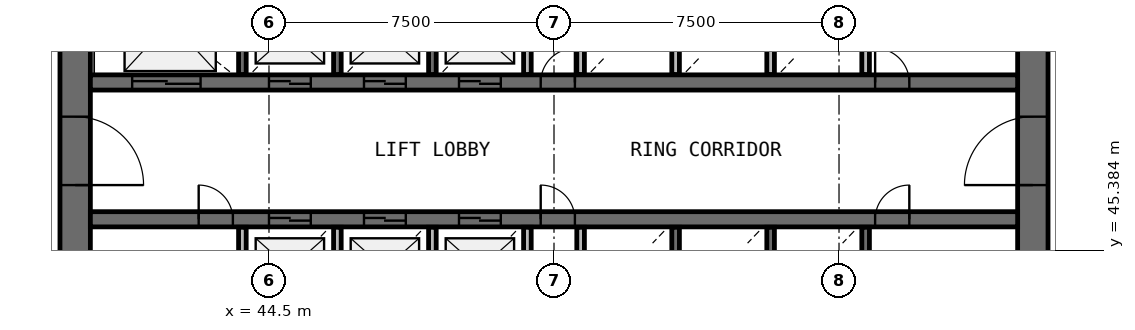
"""IFC4 building model, lengths in metres.
Left out: names, types, materials, properties, quantities, classifications, styles, units other than length and angle.
Written with IfcOpenShell. Run it as: python <this file> out.ifc"""

import sys

from ifc_helpers import new_model, si_unit, direction, frame, frame_2d, origin, place, context, subcontext, project, spatial, rectangle, extrude, source, transform, mapped, element, fill, save


model = new_model("IFC4")
c1 = context("Model", 3, precision=1e-05, world=origin(), true_north=direction((0.0, 1.0)))
c2 = subcontext(c1, "Body", "Model", "MODEL_VIEW")
j1 = project(units=[si_unit("LENGTHUNIT", "METRE"), si_unit("PLANEANGLEUNIT", "RADIAN")], contexts=[c1])
p1 = place(None, origin())
s1 = spatial("IfcSite", under=j1, at=p1, CompositionType="ELEMENT")
p2 = place(p1, origin())
s2 = spatial("IfcBuilding", under=s1, at=p2, CompositionType="ELEMENT")
p3 = place(p2, frame((0.0, 0.0, 120.8)))
s3 = spatial("IfcBuildingStorey", under=s2, at=p3, CompositionType="ELEMENT", Elevation=120.8)
p4 = place(p3, frame((64.6, 38.0, 0.0), z_axis=(0.0, 0.0, 1.0), x_axis=(0.0, 1.0, 0.0)))
e1 = element("IfcWall", 1, at=p4, inside=s3, PredefinedType="SHEAR", context=c2, shape_type="SweptSolid", body=[
    extrude(rectangle(XDim=20.0, YDim=0.8, at=frame_2d((10.0, 0.0))), origin(), (0.0, 0.0, 1.0), 4.1),
])
p5 = place(p4, frame((9.1, 0.0, 0.0)))
e2 = element("IfcOpeningElement", 2, at=p5, cuts=e1, PredefinedType="OPENING", context=c2, shape_type="SweptSolid", body=[
    extrude(rectangle(XDim=1.8, YDim=2.1, at=frame_2d((0.9, 1.05))), frame((0.0, 0.41, 0.0), z_axis=(0.0, -1.0, 0.0), x_axis=(1.0, 0.0, 0.0)), (0.0, 0.0, 1.0), 0.82),
])
p6 = place(p3, frame((39.4, 58.0, 0.0), z_axis=(0.0, 0.0, 1.0), x_axis=(0.0, -1.0, 0.0)))
e3 = element("IfcWall", 3, at=p6, inside=s3, PredefinedType="SHEAR", context=c2, shape_type="SweptSolid", body=[
    extrude(rectangle(XDim=20.0, YDim=0.8, at=frame_2d((10.0, 0.0))), origin(), (0.0, 0.0, 1.0), 4.1),
])
p7 = place(p6, frame((9.1, 0.0, 0.0)))
e4 = element("IfcOpeningElement", 4, at=p7, cuts=e3, PredefinedType="OPENING", context=c2, shape_type="SweptSolid", body=[
    extrude(rectangle(XDim=1.8, YDim=2.1, at=frame_2d((0.9, 1.05))), frame((0.0, 0.41, 0.0), z_axis=(0.0, -1.0, 0.0), x_axis=(1.0, 0.0, 0.0)), (0.0, 0.0, 1.0), 0.82),
])
p8 = place(p3, frame((39.8, 49.8, 0.0), z_axis=(0.0, 0.0, 1.0), x_axis=(1.0, 0.0, 0.0)))
e5 = element("IfcWall", 5, at=p8, inside=s3, PredefinedType="SHEAR", context=c2, shape_type="SweptSolid", body=[
    extrude(rectangle(XDim=24.4, YDim=0.4, at=frame_2d((12.2, 0.0))), origin(), (0.0, 0.0, 1.0), 4.1),
])
p9 = place(p8, frame((4.7, 0.0, 0.0)))
e6 = element("IfcOpeningElement", 6, at=p9, cuts=e5, PredefinedType="OPENING", context=c2, shape_type="SweptSolid", body=[
    extrude(rectangle(XDim=1.1, YDim=2.1, at=frame_2d((0.55, 1.05))), frame((0.0, 0.21, 0.0), z_axis=(0.0, -1.0, 0.0), x_axis=(1.0, 0.0, 0.0)), (0.0, 0.0, 1.0), 0.42),
])
p10 = place(p8, frame((7.2, 0.0, 0.0)))
e7 = element("IfcOpeningElement", 7, at=p10, cuts=e5, PredefinedType="OPENING", context=c2, shape_type="SweptSolid", body=[
    extrude(rectangle(XDim=1.1, YDim=2.1, at=frame_2d((0.55, 1.05))), frame((0.0, 0.21, 0.0), z_axis=(0.0, -1.0, 0.0), x_axis=(1.0, 0.0, 0.0)), (0.0, 0.0, 1.0), 0.42),
])
p11 = place(p8, frame((9.7, 0.0, 0.0)))
e8 = element("IfcOpeningElement", 8, at=p11, cuts=e5, PredefinedType="OPENING", context=c2, shape_type="SweptSolid", body=[
    extrude(rectangle(XDim=1.1, YDim=2.1, at=frame_2d((0.55, 1.05))), frame((0.0, 0.21, 0.0), z_axis=(0.0, -1.0, 0.0), x_axis=(1.0, 0.0, 0.0)), (0.0, 0.0, 1.0), 0.42),
])
p12 = place(p8, frame((1.1, 0.0, 0.0)))
e9 = element("IfcOpeningElement", 9, at=p12, cuts=e5, PredefinedType="OPENING", context=c2, shape_type="SweptSolid", body=[
    extrude(rectangle(XDim=1.8, YDim=2.4, at=frame_2d((0.9, 1.2))), frame((0.0, 0.21, 0.0), z_axis=(0.0, -1.0, 0.0), x_axis=(1.0, 0.0, 0.0)), (0.0, 0.0, 1.0), 0.42),
])
p13 = place(p8, frame((20.65, 0.0, 0.0)))
e10 = element("IfcOpeningElement", 10, at=p13, cuts=e5, PredefinedType="OPENING", context=c2, shape_type="SweptSolid", body=[
    extrude(rectangle(XDim=0.9, YDim=2.1, at=frame_2d((0.45, 1.05))), frame((0.0, 0.21, 0.0), z_axis=(0.0, -1.0, 0.0), x_axis=(1.0, 0.0, 0.0)), (0.0, 0.0, 1.0), 0.42),
])
p14 = place(p8, frame((11.85, 0.0, 0.0)))
e11 = element("IfcOpeningElement", 11, at=p14, cuts=e5, PredefinedType="OPENING", context=c2, shape_type="SweptSolid", body=[
    extrude(rectangle(XDim=0.9, YDim=2.1, at=frame_2d((0.45, 1.05))), frame((0.0, 0.21, 0.0), z_axis=(0.0, -1.0, 0.0), x_axis=(1.0, 0.0, 0.0)), (0.0, 0.0, 1.0), 0.42),
])
p15 = place(p3, frame((39.8, 46.2, 0.0), z_axis=(0.0, 0.0, 1.0), x_axis=(1.0, 0.0, 0.0)))
e12 = element("IfcWall", 12, at=p15, inside=s3, PredefinedType="SHEAR", context=c2, shape_type="SweptSolid", body=[
    extrude(rectangle(XDim=24.4, YDim=0.4, at=frame_2d((12.2, 0.0))), origin(), (0.0, 0.0, 1.0), 4.1),
])
p16 = place(p15, frame((4.7, 0.0, 0.0)))
e13 = element("IfcOpeningElement", 13, at=p16, cuts=e12, PredefinedType="OPENING", context=c2, shape_type="SweptSolid", body=[
    extrude(rectangle(XDim=1.1, YDim=2.1, at=frame_2d((0.55, 1.05))), frame((0.0, 0.21, 0.0), z_axis=(0.0, -1.0, 0.0), x_axis=(1.0, 0.0, 0.0)), (0.0, 0.0, 1.0), 0.42),
])
p17 = place(p15, frame((7.2, 0.0, 0.0)))
e14 = element("IfcOpeningElement", 14, at=p17, cuts=e12, PredefinedType="OPENING", context=c2, shape_type="SweptSolid", body=[
    extrude(rectangle(XDim=1.1, YDim=2.1, at=frame_2d((0.55, 1.05))), frame((0.0, 0.21, 0.0), z_axis=(0.0, -1.0, 0.0), x_axis=(1.0, 0.0, 0.0)), (0.0, 0.0, 1.0), 0.42),
])
p18 = place(p15, frame((9.7, 0.0, 0.0)))
e15 = element("IfcOpeningElement", 15, at=p18, cuts=e12, PredefinedType="OPENING", context=c2, shape_type="SweptSolid", body=[
    extrude(rectangle(XDim=1.1, YDim=2.1, at=frame_2d((0.55, 1.05))), frame((0.0, 0.21, 0.0), z_axis=(0.0, -1.0, 0.0), x_axis=(1.0, 0.0, 0.0)), (0.0, 0.0, 1.0), 0.42),
])
p19 = place(p15, frame((20.65, 0.0, 0.0)))
e16 = element("IfcOpeningElement", 16, at=p19, cuts=e12, PredefinedType="OPENING", context=c2, shape_type="SweptSolid", body=[
    extrude(rectangle(XDim=0.9, YDim=2.1, at=frame_2d((0.45, 1.05))), frame((0.0, 0.21, 0.0), z_axis=(0.0, -1.0, 0.0), x_axis=(1.0, 0.0, 0.0)), (0.0, 0.0, 1.0), 0.42),
])
p20 = place(p15, frame((2.85, 0.0, 0.0)))
e17 = element("IfcOpeningElement", 17, at=p20, cuts=e12, PredefinedType="OPENING", context=c2, shape_type="SweptSolid", body=[
    extrude(rectangle(XDim=0.9, YDim=2.1, at=frame_2d((0.45, 1.05))), frame((0.0, 0.21, 0.0), z_axis=(0.0, -1.0, 0.0), x_axis=(1.0, 0.0, 0.0)), (0.0, 0.0, 1.0), 0.42),
])
p21 = place(p15, frame((11.85, 0.0, 0.0)))
e18 = element("IfcOpeningElement", 18, at=p21, cuts=e12, PredefinedType="OPENING", context=c2, shape_type="SweptSolid", body=[
    extrude(rectangle(XDim=0.9, YDim=2.1, at=frame_2d((0.45, 1.05))), frame((0.0, 0.21, 0.0), z_axis=(0.0, -1.0, 0.0), x_axis=(1.0, 0.0, 0.0)), (0.0, 0.0, 1.0), 0.42),
])
for number, where, z_axis, x_axis in (
    (19, (43.8, 45.99, 0.0), (0.0, 0.0, 1.0), (0.0, -1.0, 0.0)),
    (20, (43.8, 52.37, 0.0), (0.0, 0.0, 1.0), (0.0, -1.0, 0.0)),
):
    element("IfcWall", number, at=place(p3, frame(where, z_axis=z_axis, x_axis=x_axis)), inside=s3, PredefinedType="SOLIDWALL", context=c2, shape_type="SweptSolid", body=[
        extrude(rectangle(XDim=2.36, YDim=0.2, at=frame_2d((1.18, 0.0))), origin(), (0.0, 0.0, 1.0), 3.7),
    ])
p22 = place(p3, frame((46.3, 43.6, 0.0), z_axis=(0.0, 0.0, 1.0), x_axis=(0.0, 1.0, 0.0)))
e21 = element("IfcWall", 21, at=p22, inside=s3, PredefinedType="SOLIDWALL", context=c2, shape_type="SweptSolid", body=[
    extrude(rectangle(XDim=2.39, YDim=0.2, at=frame_2d((1.195, 0.0))), origin(), (0.0, 0.0, 1.0), 3.7),
])
for number, where, z_axis, x_axis in (
    (22, (46.3, 50.01, 0.0), (0.0, 0.0, 1.0), (0.0, 1.0, 0.0)),
    (23, (48.8, 43.63, 0.0), (0.0, 0.0, 1.0), (0.0, 1.0, 0.0)),
    (24, (48.8, 50.01, 0.0), (0.0, 0.0, 1.0), (0.0, 1.0, 0.0)),
    (25, (51.3, 43.63, 0.0), (0.0, 0.0, 1.0), (0.0, 1.0, 0.0)),
):
    element("IfcWall", number, at=place(p3, frame(where, z_axis=z_axis, x_axis=x_axis)), inside=s3, PredefinedType="SOLIDWALL", context=c2, shape_type="SweptSolid", body=[
        extrude(rectangle(XDim=2.36, YDim=0.2, at=frame_2d((1.18, 0.0))), origin(), (0.0, 0.0, 1.0), 3.7),
    ])
for number, where, z_axis, x_axis in (
    (26, (51.3, 50.01, 0.0), (0.0, 0.0, 1.0), (0.0, 1.0, 0.0)),
    (27, (52.7, 45.99, 0.0), (0.0, 0.0, 1.0), (0.0, -1.0, 0.0)),
):
    element("IfcWall", number, at=place(p3, frame(where, z_axis=z_axis, x_axis=x_axis)), inside=s3, PredefinedType="SOLIDWALL", context=c2, shape_type="SweptSolid", body=[
        extrude(rectangle(XDim=2.39, YDim=0.2, at=frame_2d((1.195, 0.0))), origin(), (0.0, 0.0, 1.0), 3.7),
    ])
for number, where, z_axis, x_axis in (
    (28, (52.7, 52.37, 0.0), (0.0, 0.0, 1.0), (0.0, -1.0, 0.0)),
    (29, (55.2, 43.63, 0.0), (0.0, 0.0, 1.0), (0.0, 1.0, 0.0)),
    (30, (55.2, 50.01, 0.0), (0.0, 0.0, 1.0), (0.0, 1.0, 0.0)),
    (31, (57.7, 43.63, 0.0), (0.0, 0.0, 1.0), (0.0, 1.0, 0.0)),
):
    element("IfcWall", number, at=place(p3, frame(where, z_axis=z_axis, x_axis=x_axis)), inside=s3, PredefinedType="SOLIDWALL", context=c2, shape_type="SweptSolid", body=[
        extrude(rectangle(XDim=2.36, YDim=0.2, at=frame_2d((1.18, 0.0))), origin(), (0.0, 0.0, 1.0), 3.7),
    ])
p23 = place(p3, frame((57.7, 50.01, 0.0), z_axis=(0.0, 0.0, 1.0), x_axis=(0.0, 1.0, 0.0)))
e32 = element("IfcWall", 32, at=p23, inside=s3, PredefinedType="SOLIDWALL", context=c2, shape_type="SweptSolid", body=[
    extrude(rectangle(XDim=2.39, YDim=0.2, at=frame_2d((1.195, 0.0))), origin(), (0.0, 0.0, 1.0), 3.7),
])
for number, where, z_axis, x_axis in (
    (33, (60.2, 43.63, 0.0), (0.0, 0.0, 1.0), (0.0, 1.0, 0.0)),
    (34, (60.2, 50.01, 0.0), (0.0, 0.0, 1.0), (0.0, 1.0, 0.0)),
):
    element("IfcWall", number, at=place(p3, frame(where, z_axis=z_axis, x_axis=x_axis)), inside=s3, PredefinedType="SOLIDWALL", context=c2, shape_type="SweptSolid", body=[
        extrude(rectangle(XDim=2.36, YDim=0.2, at=frame_2d((1.18, 0.0))), origin(), (0.0, 0.0, 1.0), 3.7),
    ])
m1 = source(origin(), c2, "Body", "SweptSolid", [
    extrude(rectangle(XDim=1.8, YDim=2.1, at=frame_2d((0.9, 1.05))), frame((0.0, 0.025, 0.0), z_axis=(0.0, -1.0, 0.0), x_axis=(1.0, 0.0, 0.0)), (0.0, 0.0, 1.0), 0.05),
])
p24 = place(p7, origin())
e35 = element("IfcDoor", 35, at=p24, inside=s3, OperationType="SINGLE_SWING_RIGHT", PredefinedType="DOOR", context=c2, shape_type="MappedRepresentation", body=[
    mapped(m1, transform((0.0, 0.0, 0.0), scale=1.0)),
])
fill(e4, e35)
p25 = place(p5, origin())
e36 = element("IfcDoor", 36, at=p25, inside=s3, OperationType="SINGLE_SWING_LEFT", PredefinedType="DOOR", context=c2, shape_type="MappedRepresentation", body=[
    mapped(m1, transform((0.0, 0.0, 0.0), scale=1.0)),
])
fill(e2, e36)
m2 = source(origin(), c2, "Body", "SweptSolid", [
    extrude(rectangle(XDim=1.1, YDim=2.1, at=frame_2d((0.55, 1.05))), frame((0.0, 0.025, 0.0), z_axis=(0.0, -1.0, 0.0), x_axis=(1.0, 0.0, 0.0)), (0.0, 0.0, 1.0), 0.05),
])
p26 = place(p9, origin())
e37 = element("IfcDoor", 37, at=p26, inside=s3, OperationType="DOUBLE_DOOR_SLIDING", PredefinedType="USERDEFINED", context=c2, shape_type="MappedRepresentation", body=[
    mapped(m2, transform((0.0, 0.0, 0.0), scale=1.0)),
])
fill(e6, e37)
p27 = place(p10, origin())
e38 = element("IfcDoor", 38, at=p27, inside=s3, OperationType="DOUBLE_DOOR_SLIDING", PredefinedType="USERDEFINED", context=c2, shape_type="MappedRepresentation", body=[
    mapped(m2, transform((0.0, 0.0, 0.0), scale=1.0)),
])
fill(e7, e38)
p28 = place(p11, origin())
e39 = element("IfcDoor", 39, at=p28, inside=s3, OperationType="DOUBLE_DOOR_SLIDING", PredefinedType="USERDEFINED", context=c2, shape_type="MappedRepresentation", body=[
    mapped(m2, transform((0.0, 0.0, 0.0), scale=1.0)),
])
fill(e8, e39)
p29 = place(p16, origin())
e40 = element("IfcDoor", 40, at=p29, inside=s3, OperationType="DOUBLE_DOOR_SLIDING", PredefinedType="USERDEFINED", context=c2, shape_type="MappedRepresentation", body=[
    mapped(m2, transform((0.0, 0.0, 0.0), scale=1.0)),
])
fill(e13, e40)
p30 = place(p17, origin())
e41 = element("IfcDoor", 41, at=p30, inside=s3, OperationType="DOUBLE_DOOR_SLIDING", PredefinedType="USERDEFINED", context=c2, shape_type="MappedRepresentation", body=[
    mapped(m2, transform((0.0, 0.0, 0.0), scale=1.0)),
])
fill(e14, e41)
p31 = place(p18, origin())
e42 = element("IfcDoor", 42, at=p31, inside=s3, OperationType="DOUBLE_DOOR_SLIDING", PredefinedType="USERDEFINED", context=c2, shape_type="MappedRepresentation", body=[
    mapped(m2, transform((0.0, 0.0, 0.0), scale=1.0)),
])
fill(e15, e42)
m3 = source(origin(), c2, "Body", "SweptSolid", [
    extrude(rectangle(XDim=1.8, YDim=2.4, at=frame_2d((0.9, 1.2))), frame((0.0, 0.025, 0.0), z_axis=(0.0, -1.0, 0.0), x_axis=(1.0, 0.0, 0.0)), (0.0, 0.0, 1.0), 0.05),
])
p32 = place(p12, origin())
e43 = element("IfcDoor", 43, at=p32, inside=s3, OperationType="DOUBLE_DOOR_SLIDING", PredefinedType="USERDEFINED", context=c2, shape_type="MappedRepresentation", body=[
    mapped(m3, transform((0.0, 0.0, 0.0), scale=1.0)),
])
fill(e9, e43)
m4 = source(origin(), c2, "Body", "SweptSolid", [
    extrude(rectangle(XDim=0.9, YDim=2.1, at=frame_2d((0.45, 1.05))), frame((0.0, 0.025, 0.0), z_axis=(0.0, -1.0, 0.0), x_axis=(1.0, 0.0, 0.0)), (0.0, 0.0, 1.0), 0.05),
])
p33 = place(p19, origin())
e44 = element("IfcDoor", 44, at=p33, inside=s3, OperationType="SINGLE_SWING_RIGHT", PredefinedType="DOOR", context=c2, shape_type="MappedRepresentation", body=[
    mapped(m4, transform((0.0, 0.0, 0.0), scale=1.0)),
])
fill(e16, e44)
p34 = place(p13, origin())
e45 = element("IfcDoor", 45, at=p34, inside=s3, OperationType="SINGLE_SWING_LEFT", PredefinedType="DOOR", context=c2, shape_type="MappedRepresentation", body=[
    mapped(m4, transform((0.0, 0.0, 0.0), scale=1.0)),
])
fill(e10, e45)
p35 = place(p20, origin())
e46 = element("IfcDoor", 46, at=p35, inside=s3, OperationType="SINGLE_SWING_LEFT", PredefinedType="DOOR", context=c2, shape_type="MappedRepresentation", body=[
    mapped(m4, transform((0.0, 0.0, 0.0), scale=1.0)),
])
fill(e17, e46)
p36 = place(p14, origin())
e47 = element("IfcDoor", 47, at=p36, inside=s3, OperationType="SINGLE_SWING_RIGHT", PredefinedType="DOOR", context=c2, shape_type="MappedRepresentation", body=[
    mapped(m4, transform((0.0, 0.0, 0.0), scale=1.0)),
])
fill(e11, e47)
p37 = place(p21, origin())
e48 = element("IfcDoor", 48, at=p37, inside=s3, OperationType="SINGLE_SWING_LEFT", PredefinedType="DOOR", context=c2, shape_type="MappedRepresentation", body=[
    mapped(m4, transform((0.0, 0.0, 0.0), scale=1.0)),
])
fill(e18, e48)
save(model, sys.argv[1])
